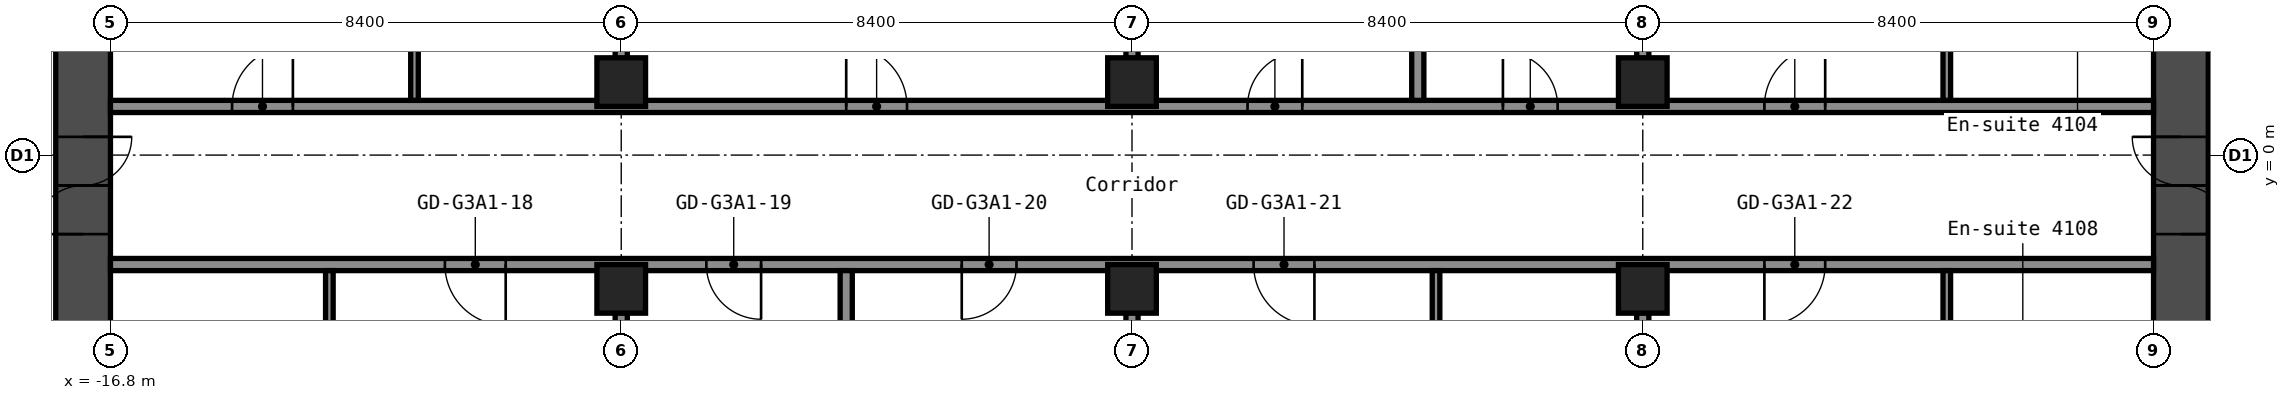
"""IFC4 building model, lengths in metres.
Left out: names, types, materials, properties, quantities, classifications, styles, units other than length and angle.
Written with IfcOpenShell. Run it as: python <this file> out.ifc"""

import sys

from ifc_helpers import new_model, si_unit, direction, frame, frame_2d, origin, origin_2d, place, context, subcontext, project, spatial, rectangle, hollow_rectangle, extrude, element, fill, save


model = new_model("IFC4")
c1 = context("Model", 3, precision=1e-05, world=origin(), true_north=direction((0.0, 1.0)))
c2 = subcontext(c1, "Body", "Model", "MODEL_VIEW")
j1 = project(units=[si_unit("LENGTHUNIT", "METRE"), si_unit("PLANEANGLEUNIT", "RADIAN")], contexts=[c1])
p1 = place(None, origin())
s1 = spatial("IfcSite", under=j1, at=p1, CompositionType="ELEMENT")
p2 = place(p1, origin())
s2 = spatial("IfcBuilding", under=s1, at=p2, CompositionType="ELEMENT")
p3 = place(p2, frame((0.0, 0.0, 147.0)))
s3 = spatial("IfcBuildingStorey", under=s2, at=p3, CompositionType="ELEMENT", Elevation=147.0)
for number, where, z_axis, x_axis in (
    (1, (-8.4, -2.2, 0.0), (0.0, 0.0, 1.0), (1.0, 0.0, 0.0)),
    (2, (-8.4, 1.2, 0.0), (0.0, 0.0, 1.0), (1.0, 0.0, 0.0)),
    (3, (0.0, -2.2, 0.0), (0.0, 0.0, 1.0), (1.0, 0.0, 0.0)),
    (4, (0.0, 1.2, 0.0), (0.0, 0.0, 1.0), (1.0, 0.0, 0.0)),
    (5, (8.4, -2.2, 0.0), (0.0, 0.0, 1.0), (1.0, 0.0, 0.0)),
    (6, (8.4, 1.2, 0.0), (0.0, 0.0, 1.0), (1.0, 0.0, 0.0)),
):
    element("IfcColumn", number, at=place(p3, frame(where, z_axis=z_axis, x_axis=x_axis)), inside=s3, PredefinedType="COLUMN", context=c2, shape_type="SweptSolid", body=[
        extrude(hollow_rectangle(XDim=0.8, YDim=0.8, WallThickness=0.032, at=origin_2d()), origin(), (0.0, 0.0, 1.0), 2.75),
    ])
p4 = place(p3, frame((-17.25, -8.4, 0.0), z_axis=(0.0, 0.0, 1.0), x_axis=(0.0, 1.0, 0.0)))
e7 = element("IfcWall", 7, at=p4, inside=s3, PredefinedType="SHEAR", context=c2, shape_type="SweptSolid", body=[
    extrude(rectangle(XDim=16.8, YDim=0.9, at=frame_2d((8.4, 0.0))), origin(), (0.0, 0.0, 1.0), 2.75),
])
p5 = place(p4, frame((7.1, 0.0, 0.0)))
e8 = element("IfcOpeningElement", 8, at=p5, cuts=e7, PredefinedType="OPENING", context=c2, shape_type="SweptSolid", body=[
    extrude(rectangle(XDim=1.6, YDim=2.1, at=frame_2d((0.8, 1.05))), frame((0.0, 0.46, 0.0), z_axis=(0.0, -1.0, 0.0), x_axis=(1.0, 0.0, 0.0)), (0.0, 0.0, 1.0), 0.92),
])
p6 = place(p3, frame((17.25, -8.4, 0.0), z_axis=(0.0, 0.0, 1.0), x_axis=(0.0, 1.0, 0.0)))
e9 = element("IfcWall", 9, at=p6, inside=s3, PredefinedType="SHEAR", context=c2, shape_type="SweptSolid", body=[
    extrude(rectangle(XDim=16.8, YDim=0.9, at=frame_2d((8.4, 0.0))), origin(), (0.0, 0.0, 1.0), 2.75),
])
p7 = place(p6, frame((7.1, 0.0, 0.0)))
e10 = element("IfcOpeningElement", 10, at=p7, cuts=e9, PredefinedType="OPENING", context=c2, shape_type="SweptSolid", body=[
    extrude(rectangle(XDim=1.6, YDim=2.1, at=frame_2d((0.8, 1.05))), frame((0.0, 0.46, 0.0), z_axis=(0.0, -1.0, 0.0), x_axis=(1.0, 0.0, 0.0)), (0.0, 0.0, 1.0), 0.92),
])
p8 = place(p3, frame((-16.8, -1.8, 0.0), z_axis=(0.0, 0.0, 1.0), x_axis=(1.0, 0.0, 0.0)))
e11 = element("IfcWall", 11, at=p8, inside=s3, PredefinedType="PARTITIONING", context=c2, shape_type="SweptSolid", body=[
    extrude(rectangle(XDim=33.6, YDim=0.2, at=frame_2d((16.8, 0.0))), origin(), (0.0, 0.0, 1.0), 2.75),
])
p9 = place(p8, frame((5.5, 0.0, 0.0)))
e12 = element("IfcOpeningElement", 12, at=p9, cuts=e11, PredefinedType="OPENING", context=c2, shape_type="SweptSolid", body=[
    extrude(rectangle(XDim=1.0, YDim=2.1, at=frame_2d((0.5, 1.05))), frame((0.0, 0.11, 0.0), z_axis=(0.0, -1.0, 0.0), x_axis=(1.0, 0.0, 0.0)), (0.0, 0.0, 1.0), 0.22),
])
p10 = place(p8, frame((9.8, 0.0, 0.0)))
e13 = element("IfcOpeningElement", 13, at=p10, cuts=e11, PredefinedType="OPENING", context=c2, shape_type="SweptSolid", body=[
    extrude(rectangle(XDim=0.9, YDim=2.1, at=frame_2d((0.45, 1.05))), frame((0.0, 0.11, 0.0), z_axis=(0.0, -1.0, 0.0), x_axis=(1.0, 0.0, 0.0)), (0.0, 0.0, 1.0), 0.22),
])
p11 = place(p8, frame((14.0, 0.0, 0.0)))
e14 = element("IfcOpeningElement", 14, at=p11, cuts=e11, PredefinedType="OPENING", context=c2, shape_type="SweptSolid", body=[
    extrude(rectangle(XDim=0.9, YDim=2.1, at=frame_2d((0.45, 1.05))), frame((0.0, 0.11, 0.0), z_axis=(0.0, -1.0, 0.0), x_axis=(1.0, 0.0, 0.0)), (0.0, 0.0, 1.0), 0.22),
])
p12 = place(p8, frame((18.8, 0.0, 0.0)))
e15 = element("IfcOpeningElement", 15, at=p12, cuts=e11, PredefinedType="OPENING", context=c2, shape_type="SweptSolid", body=[
    extrude(rectangle(XDim=1.0, YDim=2.1, at=frame_2d((0.5, 1.05))), frame((0.0, 0.11, 0.0), z_axis=(0.0, -1.0, 0.0), x_axis=(1.0, 0.0, 0.0)), (0.0, 0.0, 1.0), 0.22),
])
p13 = place(p8, frame((27.2, 0.0, 0.0)))
e16 = element("IfcOpeningElement", 16, at=p13, cuts=e11, PredefinedType="OPENING", context=c2, shape_type="SweptSolid", body=[
    extrude(rectangle(XDim=1.0, YDim=2.1, at=frame_2d((0.5, 1.05))), frame((0.0, 0.11, 0.0), z_axis=(0.0, -1.0, 0.0), x_axis=(1.0, 0.0, 0.0)), (0.0, 0.0, 1.0), 0.22),
])
p14 = place(p3, frame((-16.8, 0.8, 0.0), z_axis=(0.0, 0.0, 1.0), x_axis=(1.0, 0.0, 0.0)))
e17 = element("IfcWall", 17, at=p14, inside=s3, PredefinedType="PARTITIONING", context=c2, shape_type="SweptSolid", body=[
    extrude(rectangle(XDim=33.6, YDim=0.2, at=frame_2d((16.8, 0.0))), origin(), (0.0, 0.0, 1.0), 2.75),
])
p15 = place(p14, frame((2.0, 0.0, 0.0)))
e18 = element("IfcOpeningElement", 18, at=p15, cuts=e17, PredefinedType="OPENING", context=c2, shape_type="SweptSolid", body=[
    extrude(rectangle(XDim=1.0, YDim=2.1, at=frame_2d((0.5, 1.05))), frame((0.0, 0.11, 0.0), z_axis=(0.0, -1.0, 0.0), x_axis=(1.0, 0.0, 0.0)), (0.0, 0.0, 1.0), 0.22),
])
p16 = place(p14, frame((12.1, 0.0, 0.0)))
e19 = element("IfcOpeningElement", 19, at=p16, cuts=e17, PredefinedType="OPENING", context=c2, shape_type="SweptSolid", body=[
    extrude(rectangle(XDim=1.0, YDim=2.1, at=frame_2d((0.5, 1.05))), frame((0.0, 0.11, 0.0), z_axis=(0.0, -1.0, 0.0), x_axis=(1.0, 0.0, 0.0)), (0.0, 0.0, 1.0), 0.22),
])
p17 = place(p14, frame((18.7, 0.0, 0.0)))
e20 = element("IfcOpeningElement", 20, at=p17, cuts=e17, PredefinedType="OPENING", context=c2, shape_type="SweptSolid", body=[
    extrude(rectangle(XDim=0.9, YDim=2.1, at=frame_2d((0.45, 1.05))), frame((0.0, 0.11, 0.0), z_axis=(0.0, -1.0, 0.0), x_axis=(1.0, 0.0, 0.0)), (0.0, 0.0, 1.0), 0.22),
])
p18 = place(p14, frame((22.9, 0.0, 0.0)))
e21 = element("IfcOpeningElement", 21, at=p18, cuts=e17, PredefinedType="OPENING", context=c2, shape_type="SweptSolid", body=[
    extrude(rectangle(XDim=0.9, YDim=2.1, at=frame_2d((0.45, 1.05))), frame((0.0, 0.11, 0.0), z_axis=(0.0, -1.0, 0.0), x_axis=(1.0, 0.0, 0.0)), (0.0, 0.0, 1.0), 0.22),
])
p19 = place(p14, frame((27.2, 0.0, 0.0)))
e22 = element("IfcOpeningElement", 22, at=p19, cuts=e17, PredefinedType="OPENING", context=c2, shape_type="SweptSolid", body=[
    extrude(rectangle(XDim=1.0, YDim=2.1, at=frame_2d((0.5, 1.05))), frame((0.0, 0.11, 0.0), z_axis=(0.0, -1.0, 0.0), x_axis=(1.0, 0.0, 0.0)), (0.0, 0.0, 1.0), 0.22),
])
p20 = place(p3, frame((-13.2, -5.2, 0.0), z_axis=(0.0, 0.0, 1.0), x_axis=(0.0, 1.0, 0.0)))
e23 = element("IfcWall", 23, at=p20, inside=s3, PredefinedType="PARTITIONING", context=c2, shape_type="SweptSolid", body=[
    extrude(rectangle(XDim=3.3, YDim=0.125, at=frame_2d((1.65, 0.0))), origin(), (0.0, 0.0, 1.0), 2.75),
])
p21 = place(p20, frame((1.2, 0.0, 0.0)))
e24 = element("IfcOpeningElement", 24, at=p21, cuts=e23, PredefinedType="OPENING", context=c2, shape_type="SweptSolid", body=[
    extrude(rectangle(XDim=1.0, YDim=2.1, at=frame_2d((0.5, 1.05))), frame((0.0, 0.073, 0.0), z_axis=(0.0, -1.0, 0.0), x_axis=(1.0, 0.0, 0.0)), (0.0, 0.0, 1.0), 0.145),
])
p22 = place(p3, frame((-11.8, 0.9, 0.0), z_axis=(0.0, 0.0, 1.0), x_axis=(0.0, 1.0, 0.0)))
e25 = element("IfcWall", 25, at=p22, inside=s3, PredefinedType="PARTITIONING", context=c2, shape_type="SweptSolid", body=[
    extrude(rectangle(XDim=3.3, YDim=0.125, at=frame_2d((1.65, 0.0))), origin(), (0.0, 0.0, 1.0), 2.75),
])
for number, where, z_axis, x_axis in (
    (26, (-8.4, -19.3, 0.0), (0.0, 0.0, 1.0), (0.0, 1.0, 0.0)),
    (27, (-8.4, 1.59, 0.0), (0.0, 0.0, 1.0), (0.0, 1.0, 0.0)),
):
    element("IfcWall", number, at=place(p3, frame(where, z_axis=z_axis, x_axis=x_axis)), inside=s3, PredefinedType="PARTITIONING", context=c2, shape_type="SweptSolid", body=[
        extrude(rectangle(XDim=16.71, YDim=0.2, at=frame_2d((8.355, 0.0))), origin(), (0.0, 0.0, 1.0), 2.75),
    ])
p23 = place(p3, frame((-4.7, -19.3, 0.0), z_axis=(0.0, 0.0, 1.0), x_axis=(0.0, 1.0, 0.0)))
e28 = element("IfcWall", 28, at=p23, inside=s3, PredefinedType="PARTITIONING", context=c2, shape_type="SweptSolid", body=[
    extrude(rectangle(XDim=17.4, YDim=0.2, at=frame_2d((8.7, 0.0))), origin(), (0.0, 0.0, 1.0), 2.75),
])
for number, where, z_axis, x_axis in (
    (29, (0.0, -19.3, 0.0), (0.0, 0.0, 1.0), (0.0, 1.0, 0.0)),
    (30, (0.0, 1.59, 0.0), (0.0, 0.0, 1.0), (0.0, 1.0, 0.0)),
):
    element("IfcWall", number, at=place(p3, frame(where, z_axis=z_axis, x_axis=x_axis)), inside=s3, PredefinedType="PARTITIONING", context=c2, shape_type="SweptSolid", body=[
        extrude(rectangle(XDim=16.71, YDim=0.2, at=frame_2d((8.355, 0.0))), origin(), (0.0, 0.0, 1.0), 2.75),
    ])
p24 = place(p3, frame((4.7, 0.9, 0.0), z_axis=(0.0, 0.0, 1.0), x_axis=(0.0, 1.0, 0.0)))
e31 = element("IfcWall", 31, at=p24, inside=s3, PredefinedType="PARTITIONING", context=c2, shape_type="SweptSolid", body=[
    extrude(rectangle(XDim=17.4, YDim=0.2, at=frame_2d((8.7, 0.0))), origin(), (0.0, 0.0, 1.0), 2.75),
])
p25 = place(p3, frame((5.0, -5.2, 0.0), z_axis=(0.0, 0.0, 1.0), x_axis=(0.0, 1.0, 0.0)))
e32 = element("IfcWall", 32, at=p25, inside=s3, PredefinedType="PARTITIONING", context=c2, shape_type="SweptSolid", body=[
    extrude(rectangle(XDim=3.3, YDim=0.125, at=frame_2d((1.65, 0.0))), origin(), (0.0, 0.0, 1.0), 2.75),
])
for number, where, z_axis, x_axis in (
    (33, (8.4, -19.3, 0.0), (0.0, 0.0, 1.0), (0.0, 1.0, 0.0)),
    (34, (8.4, 1.59, 0.0), (0.0, 0.0, 1.0), (0.0, 1.0, 0.0)),
):
    element("IfcWall", number, at=place(p3, frame(where, z_axis=z_axis, x_axis=x_axis)), inside=s3, PredefinedType="PARTITIONING", context=c2, shape_type="SweptSolid", body=[
        extrude(rectangle(XDim=16.71, YDim=0.2, at=frame_2d((8.355, 0.0))), origin(), (0.0, 0.0, 1.0), 2.75),
    ])
for number, where, z_axis, x_axis in (
    (35, (13.4, -5.2, 0.0), (0.0, 0.0, 1.0), (0.0, 1.0, 0.0)),
    (36, (13.4, 0.9, 0.0), (0.0, 0.0, 1.0), (0.0, 1.0, 0.0)),
):
    element("IfcWall", number, at=place(p3, frame(where, z_axis=z_axis, x_axis=x_axis)), inside=s3, PredefinedType="PARTITIONING", context=c2, shape_type="SweptSolid", body=[
        extrude(rectangle(XDim=3.3, YDim=0.125, at=frame_2d((1.65, 0.0))), origin(), (0.0, 0.0, 1.0), 2.75),
    ])
p26 = place(p5, origin())
e37 = element("IfcDoor", 37, at=p26, inside=s3, OperationType="DOUBLE_DOOR_SINGLE_SWING", PredefinedType="DOOR", context=c2, shape_type="SweptSolid", body=[
    extrude(rectangle(XDim=1.6, YDim=2.1, at=frame_2d((0.8, 1.05))), frame((0.0, 0.025, 0.0), z_axis=(0.0, -1.0, 0.0), x_axis=(1.0, 0.0, 0.0)), (0.0, 0.0, 1.0), 0.05),
])
fill(e8, e37)
p27 = place(p7, origin())
e38 = element("IfcDoor", 38, at=p27, inside=s3, OperationType="DOUBLE_DOOR_SINGLE_SWING", PredefinedType="DOOR", context=c2, shape_type="SweptSolid", body=[
    extrude(rectangle(XDim=1.6, YDim=2.1, at=frame_2d((0.8, 1.05))), frame((0.0, 0.025, 0.0), z_axis=(0.0, -1.0, 0.0), x_axis=(1.0, 0.0, 0.0)), (0.0, 0.0, 1.0), 0.05),
])
fill(e10, e38)
p28 = place(p9, origin())
e39 = element("IfcDoor", 39, at=p28, inside=s3, OperationType="SINGLE_SWING_RIGHT", PredefinedType="DOOR", context=c2, shape_type="SweptSolid", body=[
    extrude(rectangle(XDim=1.0, YDim=2.1, at=frame_2d((0.5, 1.05))), frame((0.0, 0.025, 0.0), z_axis=(0.0, -1.0, 0.0), x_axis=(1.0, 0.0, 0.0)), (0.0, 0.0, 1.0), 0.05),
])
fill(e12, e39)
p29 = place(p10, origin())
e40 = element("IfcDoor", 40, at=p29, inside=s3, OperationType="SINGLE_SWING_RIGHT", PredefinedType="DOOR", context=c2, shape_type="SweptSolid", body=[
    extrude(rectangle(XDim=0.9, YDim=2.1, at=frame_2d((0.45, 1.05))), frame((0.0, 0.025, 0.0), z_axis=(0.0, -1.0, 0.0), x_axis=(1.0, 0.0, 0.0)), (0.0, 0.0, 1.0), 0.05),
])
fill(e13, e40)
p30 = place(p11, origin())
e41 = element("IfcDoor", 41, at=p30, inside=s3, OperationType="SINGLE_SWING_LEFT", PredefinedType="DOOR", context=c2, shape_type="SweptSolid", body=[
    extrude(rectangle(XDim=0.9, YDim=2.1, at=frame_2d((0.45, 1.05))), frame((0.0, 0.025, 0.0), z_axis=(0.0, -1.0, 0.0), x_axis=(1.0, 0.0, 0.0)), (0.0, 0.0, 1.0), 0.05),
])
fill(e14, e41)
p31 = place(p12, origin())
e42 = element("IfcDoor", 42, at=p31, inside=s3, OperationType="SINGLE_SWING_RIGHT", PredefinedType="DOOR", context=c2, shape_type="SweptSolid", body=[
    extrude(rectangle(XDim=1.0, YDim=2.1, at=frame_2d((0.5, 1.05))), frame((0.0, 0.025, 0.0), z_axis=(0.0, -1.0, 0.0), x_axis=(1.0, 0.0, 0.0)), (0.0, 0.0, 1.0), 0.05),
])
fill(e15, e42)
p32 = place(p13, origin())
e43 = element("IfcDoor", 43, at=p32, inside=s3, OperationType="SINGLE_SWING_LEFT", PredefinedType="DOOR", context=c2, shape_type="SweptSolid", body=[
    extrude(rectangle(XDim=1.0, YDim=2.1, at=frame_2d((0.5, 1.05))), frame((0.0, 0.025, 0.0), z_axis=(0.0, -1.0, 0.0), x_axis=(1.0, 0.0, 0.0)), (0.0, 0.0, 1.0), 0.05),
])
fill(e16, e43)
p33 = place(p15, origin())
e44 = element("IfcDoor", 44, at=p33, inside=s3, OperationType="SINGLE_SWING_LEFT", PredefinedType="DOOR", context=c2, shape_type="SweptSolid", body=[
    extrude(rectangle(XDim=1.0, YDim=2.1, at=frame_2d((0.5, 1.05))), frame((0.0, 0.025, 0.0), z_axis=(0.0, -1.0, 0.0), x_axis=(1.0, 0.0, 0.0)), (0.0, 0.0, 1.0), 0.05),
])
fill(e18, e44)
p34 = place(p16, origin())
e45 = element("IfcDoor", 45, at=p34, inside=s3, OperationType="SINGLE_SWING_RIGHT", PredefinedType="DOOR", context=c2, shape_type="SweptSolid", body=[
    extrude(rectangle(XDim=1.0, YDim=2.1, at=frame_2d((0.5, 1.05))), frame((0.0, 0.025, 0.0), z_axis=(0.0, -1.0, 0.0), x_axis=(1.0, 0.0, 0.0)), (0.0, 0.0, 1.0), 0.05),
])
fill(e19, e45)
p35 = place(p17, origin())
e46 = element("IfcDoor", 46, at=p35, inside=s3, OperationType="SINGLE_SWING_LEFT", PredefinedType="DOOR", context=c2, shape_type="SweptSolid", body=[
    extrude(rectangle(XDim=0.9, YDim=2.1, at=frame_2d((0.45, 1.05))), frame((0.0, 0.025, 0.0), z_axis=(0.0, -1.0, 0.0), x_axis=(1.0, 0.0, 0.0)), (0.0, 0.0, 1.0), 0.05),
])
fill(e20, e46)
p36 = place(p18, origin())
e47 = element("IfcDoor", 47, at=p36, inside=s3, OperationType="SINGLE_SWING_RIGHT", PredefinedType="DOOR", context=c2, shape_type="SweptSolid", body=[
    extrude(rectangle(XDim=0.9, YDim=2.1, at=frame_2d((0.45, 1.05))), frame((0.0, 0.025, 0.0), z_axis=(0.0, -1.0, 0.0), x_axis=(1.0, 0.0, 0.0)), (0.0, 0.0, 1.0), 0.05),
])
fill(e21, e47)
p37 = place(p19, origin())
e48 = element("IfcDoor", 48, at=p37, inside=s3, OperationType="SINGLE_SWING_LEFT", PredefinedType="DOOR", context=c2, shape_type="SweptSolid", body=[
    extrude(rectangle(XDim=1.0, YDim=2.1, at=frame_2d((0.5, 1.05))), frame((0.0, 0.025, 0.0), z_axis=(0.0, -1.0, 0.0), x_axis=(1.0, 0.0, 0.0)), (0.0, 0.0, 1.0), 0.05),
])
fill(e22, e48)
save(model, sys.argv[1])
